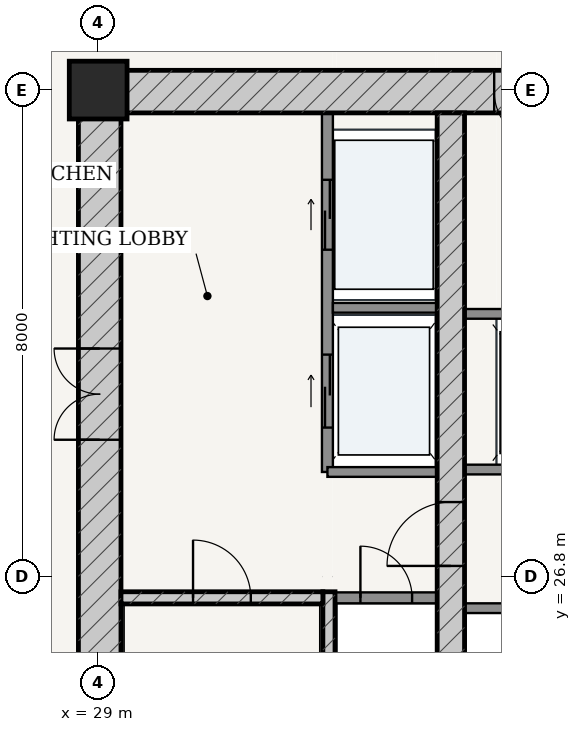
"""IFC4 building model, lengths in metres.
Left out: names, types, materials, properties, quantities, classifications, styles, units other than length and angle.
Written with IfcOpenShell. Run it as: python <this file> out.ifc"""

import sys

from ifc_helpers import new_model, si_unit, direction, frame, frame_2d, origin, origin_2d, place, context, subcontext, project, spatial, rectangle, extrude, source, transform, mapped, element, fill, save


model = new_model("IFC4")
c1 = context("Model", 3, precision=1e-05, world=origin(), true_north=direction((-0.2419218956, 0.970295726276)))
c2 = subcontext(c1, "Body", "Model", "MODEL_VIEW")
j1 = project(units=[si_unit("LENGTHUNIT", "METRE"), si_unit("PLANEANGLEUNIT", "RADIAN")], contexts=[c1])
p1 = place(None, origin())
s1 = spatial("IfcSite", under=j1, at=p1, CompositionType="ELEMENT")
p2 = place(p1, origin())
s2 = spatial("IfcBuilding", under=s1, at=p2, CompositionType="ELEMENT")
p3 = place(p2, frame((0.0, 0.0, 87.0)))
s3 = spatial("IfcBuildingStorey", under=s2, at=p3, CompositionType="ELEMENT", Elevation=87.0)
p4 = place(p3, frame((29.0, 34.8, 0.0), z_axis=(0.0, 0.0, 1.0), x_axis=(1.0, 0.0, 0.0)))
e1 = element("IfcColumn", 1, at=p4, inside=s3, PredefinedType="COLUMN", context=c2, shape_type="SweptSolid", body=[
    extrude(rectangle(XDim=0.95, YDim=0.95, at=origin_2d()), origin(), (0.0, 0.0, 1.0), 3.6),
])
p5 = place(p3, frame((28.675, 34.775, 0.0), z_axis=(0.0, 0.0, 1.0), x_axis=(1.0, 0.0, 0.0)))
e2 = element("IfcWall", 2, at=p5, inside=s3, PredefinedType="SHEAR", context=c2, shape_type="SweptSolid", body=[
    extrude(rectangle(XDim=18.65, YDim=0.7, at=frame_2d((9.325, 0.0))), origin(), (0.0, 0.0, 1.0), 3.325),
])
p6 = place(p5, frame((6.837, 0.0, 0.0)))
e3 = element("IfcOpeningElement", 3, at=p6, cuts=e2, PredefinedType="OPENING", context=c2, shape_type="SweptSolid", body=[
    extrude(rectangle(XDim=0.85, YDim=2.1, at=frame_2d((0.425, 1.05))), frame((0.0, 0.36, 0.0), z_axis=(0.0, -1.0, 0.0), x_axis=(1.0, 0.0, 0.0)), (0.0, 0.0, 1.0), 0.72),
])
p7 = place(p5, frame((8.895, 0.0, 0.0)))
e4 = element("IfcOpeningElement", 4, at=p7, cuts=e2, PredefinedType="OPENING", context=c2, shape_type="SweptSolid", body=[
    extrude(rectangle(XDim=0.86, YDim=2.1, at=frame_2d((0.43, 1.05))), frame((0.0, 0.36, 0.0), z_axis=(0.0, -1.0, 0.0), x_axis=(1.0, 0.0, 0.0)), (0.0, 0.0, 1.0), 0.72),
])
p8 = place(p5, frame((10.962, 0.0, 0.0)))
e5 = element("IfcOpeningElement", 5, at=p8, cuts=e2, PredefinedType="OPENING", context=c2, shape_type="SweptSolid", body=[
    extrude(rectangle(XDim=0.85, YDim=2.1, at=frame_2d((0.425, 1.05))), frame((0.0, 0.36, 0.0), z_axis=(0.0, -1.0, 0.0), x_axis=(1.0, 0.0, 0.0)), (0.0, 0.0, 1.0), 0.72),
])
p9 = place(p3, frame((29.025, 19.175, 0.0), z_axis=(0.0, 0.0, 1.0), x_axis=(0.0, 1.0, 0.0)))
e6 = element("IfcWall", 6, at=p9, inside=s3, PredefinedType="SHEAR", context=c2, shape_type="SweptSolid", body=[
    extrude(rectangle(XDim=15.25, YDim=0.7, at=frame_2d((7.625, 0.0))), origin(), (0.0, 0.0, 1.0), 3.325),
])
p10 = place(p9, frame((9.875, 0.0, 0.0)))
e7 = element("IfcOpeningElement", 7, at=p10, cuts=e6, PredefinedType="OPENING", context=c2, shape_type="SweptSolid", body=[
    extrude(rectangle(XDim=1.5, YDim=2.2, at=frame_2d((0.75, 1.1))), frame((0.0, 0.36, 0.0), z_axis=(0.0, -1.0, 0.0), x_axis=(1.0, 0.0, 0.0)), (0.0, 0.0, 1.0), 0.72),
])
p11 = place(p3, frame((32.795, 19.175, 0.0), z_axis=(0.0, 0.0, 1.0), x_axis=(0.0, 1.0, 0.0)))
e8 = element("IfcWall", 8, at=p11, inside=s3, PredefinedType="SOLIDWALL", context=c2, shape_type="SweptSolid", body=[
    extrude(rectangle(XDim=7.375, YDim=0.2, at=frame_2d((3.688, 0.0))), origin(), (0.0, 0.0, 1.0), 3.325),
])
p12 = place(p3, frame((29.375, 26.45, 0.0), z_axis=(0.0, 0.0, 1.0), x_axis=(1.0, 0.0, 0.0)))
e9 = element("IfcWall", 9, at=p12, inside=s3, PredefinedType="SOLIDWALL", context=c2, shape_type="SweptSolid", body=[
    extrude(rectangle(XDim=3.32, YDim=0.2, at=frame_2d((1.66, 0.0))), origin(), (0.0, 0.0, 1.0), 3.325),
])
p13 = place(p12, frame((1.185, 0.0, 0.0)))
e10 = element("IfcOpeningElement", 10, at=p13, cuts=e9, PredefinedType="OPENING", context=c2, shape_type="SweptSolid", body=[
    extrude(rectangle(XDim=0.95, YDim=2.15, at=frame_2d((0.475, 1.075))), frame((0.0, 0.11, 0.0), z_axis=(0.0, -1.0, 0.0), x_axis=(1.0, 0.0, 0.0)), (0.0, 0.0, 1.0), 0.22),
])
p14 = place(p3, frame((34.8, 19.175, 0.0), z_axis=(0.0, 0.0, 1.0), x_axis=(0.0, 1.0, 0.0)))
e11 = element("IfcWall", 11, at=p14, inside=s3, PredefinedType="SHEAR", context=c2, shape_type="SweptSolid", body=[
    extrude(rectangle(XDim=15.25, YDim=0.45, at=frame_2d((7.625, 0.0))), origin(), (0.0, 0.0, 1.0), 3.325),
])
p15 = place(p14, frame((7.8, 0.0, 0.0)))
e12 = element("IfcOpeningElement", 12, at=p15, cuts=e11, PredefinedType="OPENING", context=c2, shape_type="SweptSolid", body=[
    extrude(rectangle(XDim=1.05, YDim=2.15, at=frame_2d((0.525, 1.075))), frame((0.0, 0.235, 0.0), z_axis=(0.0, -1.0, 0.0), x_axis=(1.0, 0.0, 0.0)), (0.0, 0.0, 1.0), 0.47),
])
p16 = place(p3, frame((32.9, 26.45, 0.0), z_axis=(0.0, 0.0, 1.0), x_axis=(1.0, 0.0, 0.0)))
e13 = element("IfcWall", 13, at=p16, inside=s3, PredefinedType="PARTITIONING", context=c2, shape_type="SweptSolid", body=[
    extrude(rectangle(XDim=1.675, YDim=0.18, at=frame_2d((0.837, 0.0))), origin(), (0.0, 0.0, 1.0), 3.325),
])
p17 = place(p16, frame((0.413, 0.0, 0.0)))
e14 = element("IfcOpeningElement", 14, at=p17, cuts=e13, PredefinedType="OPENING", context=c2, shape_type="SweptSolid", body=[
    extrude(rectangle(XDim=0.85, YDim=2.1, at=frame_2d((0.425, 1.05))), frame((0.0, 0.1, 0.0), z_axis=(0.0, -1.0, 0.0), x_axis=(1.0, 0.0, 0.0)), (0.0, 0.0, 1.0), 0.2),
])
p18 = place(p3, frame((32.77, 28.52, 0.0), z_axis=(0.0, 0.0, 1.0), x_axis=(0.0, 1.0, 0.0)))
e15 = element("IfcWall", 15, at=p18, inside=s3, PredefinedType="PARTITIONING", context=c2, shape_type="SweptSolid", body=[
    extrude(rectangle(XDim=5.905, YDim=0.18, at=frame_2d((2.953, 0.0))), origin(), (0.0, 0.0, 1.0), 3.325),
])
p19 = place(p18, frame((3.655, 0.0, 0.0)))
e16 = element("IfcOpeningElement", 16, at=p19, cuts=e15, PredefinedType="OPENING", context=c2, shape_type="SweptSolid", body=[
    extrude(rectangle(XDim=1.15, YDim=2.2, at=frame_2d((0.575, 1.1))), frame((0.0, 0.1, 0.0), z_axis=(0.0, -1.0, 0.0), x_axis=(1.0, 0.0, 0.0)), (0.0, 0.0, 1.0), 0.2),
])
p20 = place(p18, frame((0.73, 0.0, 0.0)))
e17 = element("IfcOpeningElement", 17, at=p20, cuts=e15, PredefinedType="OPENING", context=c2, shape_type="SweptSolid", body=[
    extrude(rectangle(XDim=1.2, YDim=2.25, at=frame_2d((0.6, 1.125))), frame((0.0, 0.1, 0.0), z_axis=(0.0, -1.0, 0.0), x_axis=(1.0, 0.0, 0.0)), (0.0, 0.0, 1.0), 0.2),
])
p21 = place(p3, frame((32.86, 31.22, 0.0), z_axis=(0.0, 0.0, 1.0), x_axis=(1.0, 0.0, 0.0)))
e18 = element("IfcWall", 18, at=p21, inside=s3, PredefinedType="PARTITIONING", context=c2, shape_type="SweptSolid", body=[
    extrude(rectangle(XDim=1.715, YDim=0.16, at=frame_2d((0.857, 0.0))), origin(), (0.0, 0.0, 1.0), 3.325),
])
p22 = place(p3, frame((32.77, 28.52, 0.0), z_axis=(0.0, 0.0, 1.0), x_axis=(1.0, 0.0, 0.0)))
e19 = element("IfcWall", 19, at=p22, inside=s3, PredefinedType="PARTITIONING", context=c2, shape_type="SweptSolid", body=[
    extrude(rectangle(XDim=1.805, YDim=0.16, at=frame_2d((0.902, 0.0))), origin(), (0.0, 0.0, 1.0), 3.325),
])
p23 = place(p3, frame((35.025, 28.56, 0.0), z_axis=(0.0, 0.0, 1.0), x_axis=(1.0, 0.0, 0.0)))
e20 = element("IfcWall", 20, at=p23, inside=s3, PredefinedType="PARTITIONING", context=c2, shape_type="SweptSolid", body=[
    extrude(rectangle(XDim=5.95, YDim=0.16, at=frame_2d((2.975, 0.0))), origin(), (0.0, 0.0, 1.0), 3.325),
])
p24 = place(p23, frame((0.76, 0.0, 0.0)))
e21 = element("IfcOpeningElement", 21, at=p24, cuts=e20, PredefinedType="OPENING", context=c2, shape_type="SweptSolid", body=[
    extrude(rectangle(XDim=1.1, YDim=2.2, at=frame_2d((0.55, 1.1))), frame((0.0, 0.09, 0.0), z_axis=(0.0, -1.0, 0.0), x_axis=(1.0, 0.0, 0.0)), (0.0, 0.0, 1.0), 0.18),
])
p25 = place(p23, frame((2.425, 0.0, 0.0)))
e22 = element("IfcOpeningElement", 22, at=p25, cuts=e20, PredefinedType="OPENING", context=c2, shape_type="SweptSolid", body=[
    extrude(rectangle(XDim=1.1, YDim=2.2, at=frame_2d((0.55, 1.1))), frame((0.0, 0.09, 0.0), z_axis=(0.0, -1.0, 0.0), x_axis=(1.0, 0.0, 0.0)), (0.0, 0.0, 1.0), 0.18),
])
p26 = place(p23, frame((4.09, 0.0, 0.0)))
e23 = element("IfcOpeningElement", 23, at=p26, cuts=e20, PredefinedType="OPENING", context=c2, shape_type="SweptSolid", body=[
    extrude(rectangle(XDim=1.1, YDim=2.2, at=frame_2d((0.55, 1.1))), frame((0.0, 0.09, 0.0), z_axis=(0.0, -1.0, 0.0), x_axis=(1.0, 0.0, 0.0)), (0.0, 0.0, 1.0), 0.18),
])
for number, where, z_axis, x_axis in (
    (24, (35.025, 31.12, 0.0), (0.0, 0.0, 1.0), (1.0, 0.0, 0.0)),
    (25, (35.025, 26.28, 0.0), (0.0, 0.0, 1.0), (1.0, 0.0, 0.0)),
):
    element("IfcWall", number, at=place(p3, frame(where, z_axis=z_axis, x_axis=x_axis)), inside=s3, PredefinedType="PARTITIONING", context=c2, shape_type="SweptSolid", body=[
        extrude(rectangle(XDim=5.95, YDim=0.16, at=frame_2d((2.975, 0.0))), origin(), (0.0, 0.0, 1.0), 3.325),
    ])
m1 = source(origin(), c2, "Body", "SweptSolid", [
    extrude(rectangle(XDim=1.5, YDim=2.2, at=frame_2d((0.75, 1.1))), frame((0.0, 0.025, 0.0), z_axis=(0.0, -1.0, 0.0), x_axis=(1.0, 0.0, 0.0)), (0.0, 0.0, 1.0), 0.05),
])
p27 = place(p10, origin())
e26 = element("IfcDoor", 26, at=p27, inside=s3, OperationType="DOUBLE_DOOR_SINGLE_SWING", PredefinedType="DOOR", context=c2, shape_type="MappedRepresentation", body=[
    mapped(m1, transform((0.0, 0.0, 0.0), scale=1.0)),
])
fill(e7, e26)
m2 = source(origin(), c2, "Body", "SweptSolid", [
    extrude(rectangle(XDim=1.05, YDim=2.15, at=frame_2d((0.525, 1.075))), frame((0.0, 0.025, 0.0), z_axis=(0.0, -1.0, 0.0), x_axis=(1.0, 0.0, 0.0)), (0.0, 0.0, 1.0), 0.05),
])
p28 = place(p15, origin())
e27 = element("IfcDoor", 27, at=p28, inside=s3, OperationType="SINGLE_SWING_LEFT", PredefinedType="DOOR", context=c2, shape_type="MappedRepresentation", body=[
    mapped(m2, transform((0.0, 0.0, 0.0), scale=1.0)),
])
fill(e12, e27)
m3 = source(origin(), c2, "Body", "SweptSolid", [
    extrude(rectangle(XDim=0.95, YDim=2.15, at=frame_2d((0.475, 1.075))), frame((0.0, 0.025, 0.0), z_axis=(0.0, -1.0, 0.0), x_axis=(1.0, 0.0, 0.0)), (0.0, 0.0, 1.0), 0.05),
])
p29 = place(p13, origin())
e28 = element("IfcDoor", 28, at=p29, inside=s3, OperationType="SINGLE_SWING_LEFT", PredefinedType="DOOR", context=c2, shape_type="MappedRepresentation", body=[
    mapped(m3, transform((0.0, 0.0, 0.0), scale=1.0)),
])
fill(e10, e28)
m4 = source(origin(), c2, "Body", "SweptSolid", [
    extrude(rectangle(XDim=0.85, YDim=2.1, at=frame_2d((0.425, 1.05))), frame((0.0, 0.025, 0.0), z_axis=(0.0, -1.0, 0.0), x_axis=(1.0, 0.0, 0.0)), (0.0, 0.0, 1.0), 0.05),
])
p30 = place(p17, origin())
e29 = element("IfcDoor", 29, at=p30, inside=s3, OperationType="SINGLE_SWING_LEFT", PredefinedType="DOOR", context=c2, shape_type="MappedRepresentation", body=[
    mapped(m4, transform((0.0, 0.0, 0.0), scale=1.0)),
])
fill(e14, e29)
p31 = place(p6, frame((0.85, 0.0, 0.0), z_axis=(0.0, 0.0, 1.0), x_axis=(-1.0, 0.0, 0.0)))
e30 = element("IfcDoor", 30, at=p31, inside=s3, OperationType="SINGLE_SWING_LEFT", PredefinedType="DOOR", context=c2, shape_type="MappedRepresentation", body=[
    mapped(m4, transform((0.0, 0.0, 0.0), scale=1.0)),
])
fill(e3, e30)
m5 = source(origin(), c2, "Body", "SweptSolid", [
    extrude(rectangle(XDim=1.15, YDim=2.2, at=frame_2d((0.575, 1.1))), frame((0.0, 0.025, 0.0), z_axis=(0.0, -1.0, 0.0), x_axis=(1.0, 0.0, 0.0)), (0.0, 0.0, 1.0), 0.05),
])
p32 = place(p19, origin())
e31 = element("IfcDoor", 31, at=p32, inside=s3, OperationType="DOUBLE_DOOR_SLIDING", PredefinedType="DOOR", context=c2, shape_type="MappedRepresentation", body=[
    mapped(m5, transform((0.0, 0.0, 0.0), scale=1.0)),
])
fill(e16, e31)
m6 = source(origin(), c2, "Body", "SweptSolid", [
    extrude(rectangle(XDim=1.2, YDim=2.25, at=frame_2d((0.6, 1.125))), frame((0.0, 0.025, 0.0), z_axis=(0.0, -1.0, 0.0), x_axis=(1.0, 0.0, 0.0)), (0.0, 0.0, 1.0), 0.05),
])
p33 = place(p20, origin())
e32 = element("IfcDoor", 32, at=p33, inside=s3, OperationType="DOUBLE_DOOR_SLIDING", PredefinedType="DOOR", context=c2, shape_type="MappedRepresentation", body=[
    mapped(m6, transform((0.0, 0.0, 0.0), scale=1.0)),
])
fill(e17, e32)
save(model, sys.argv[1])
